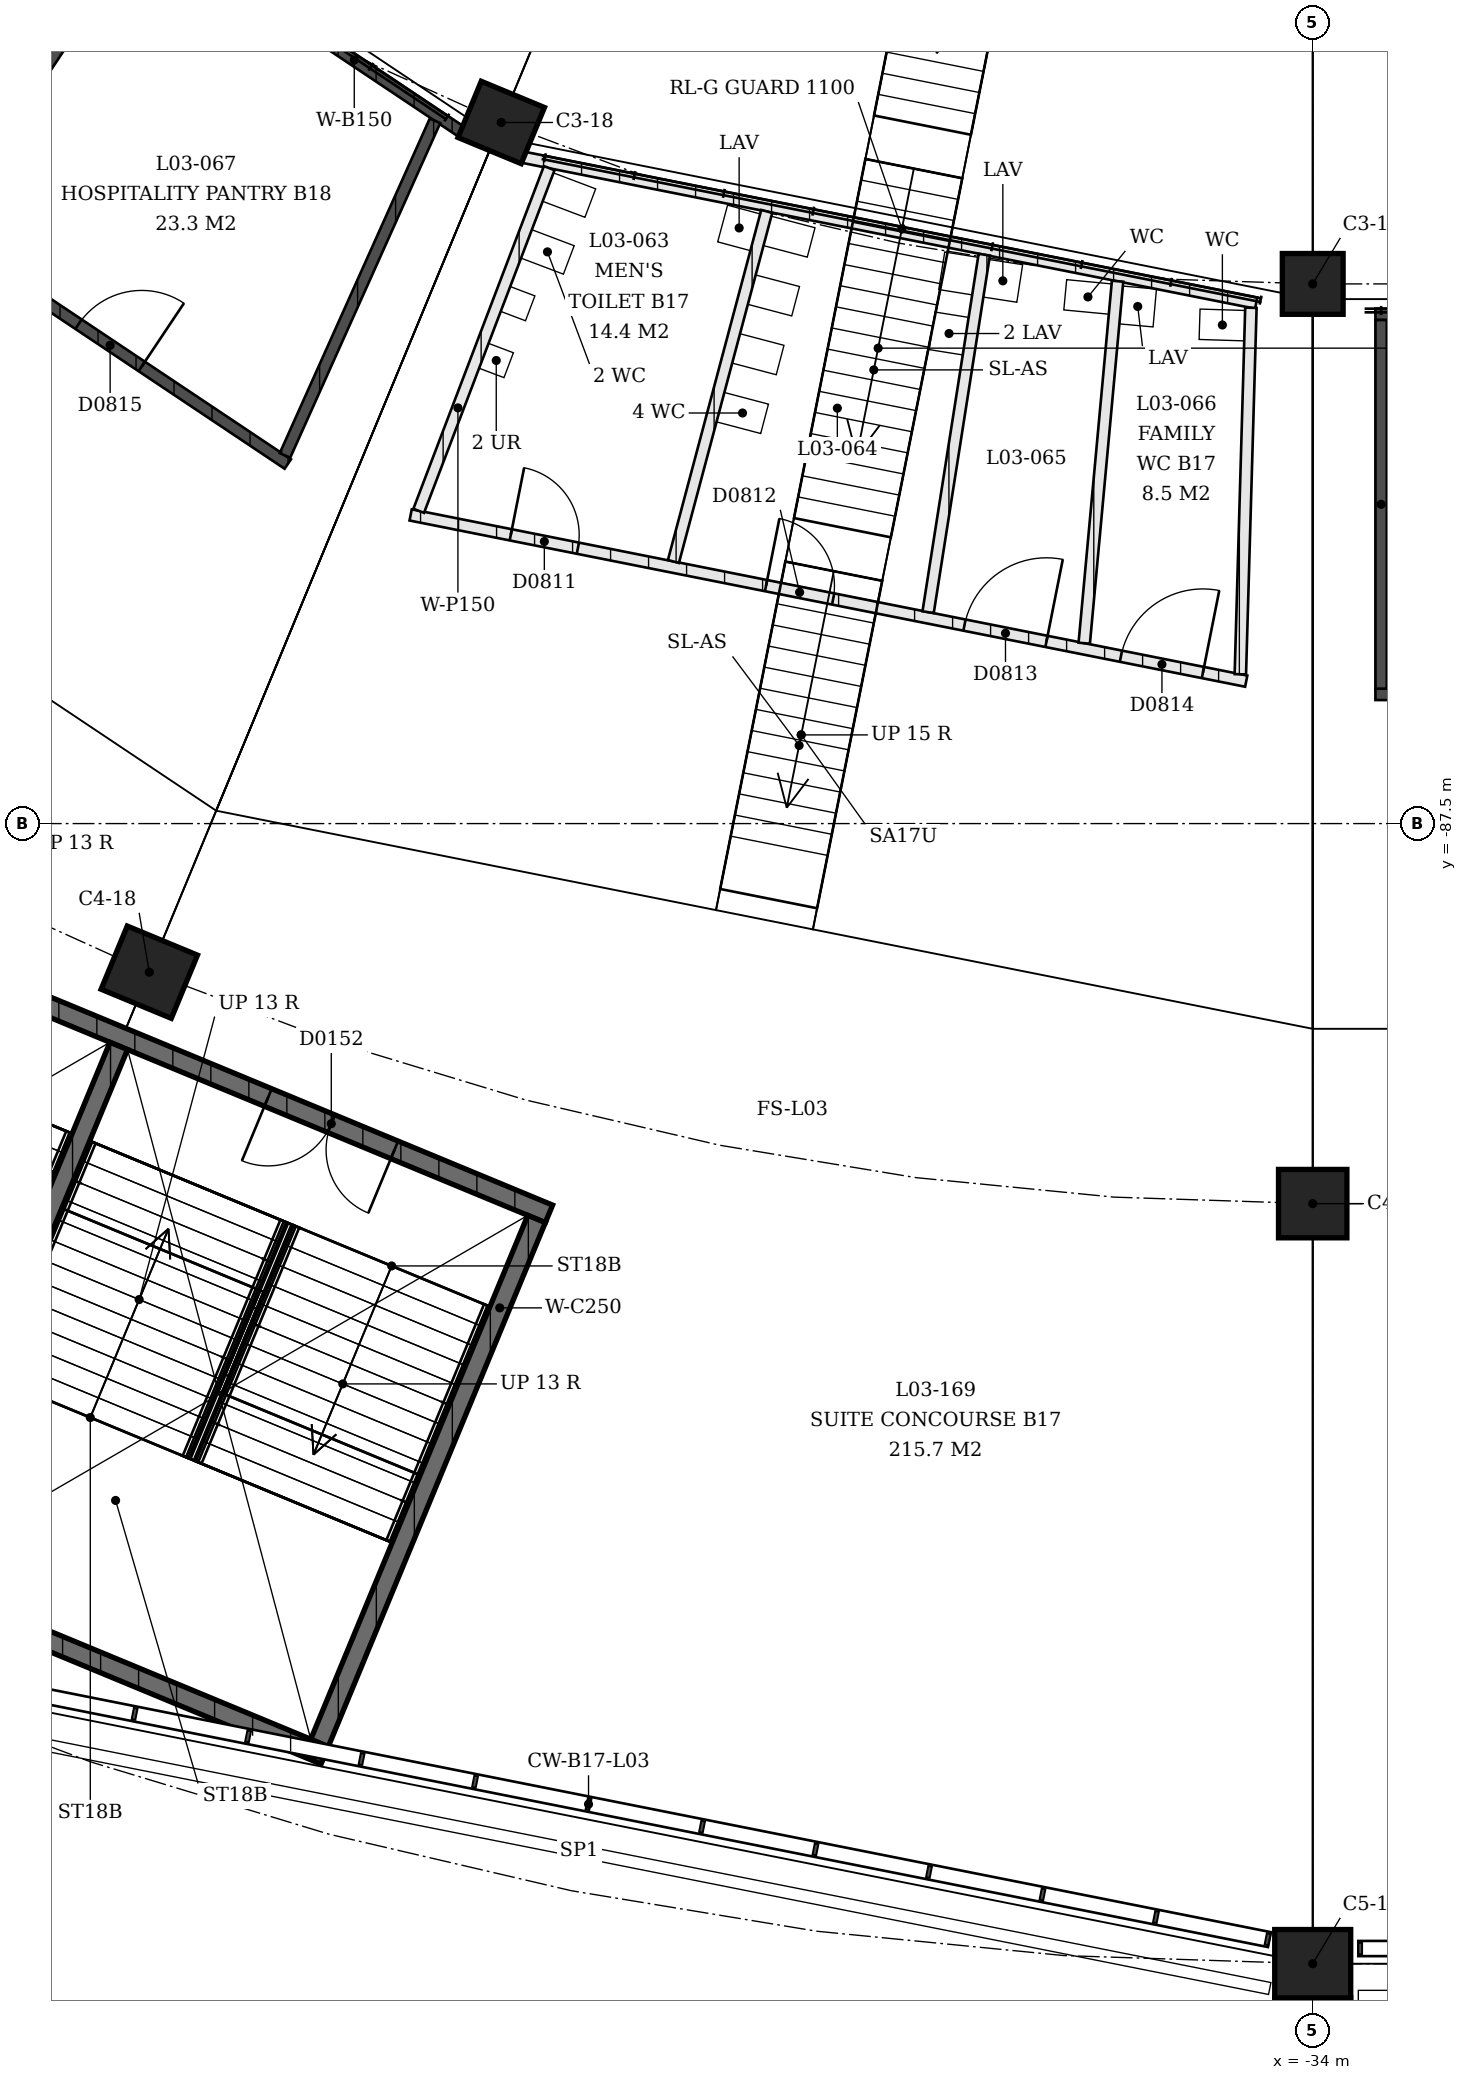
"""IFC4 building model, lengths in metres.
Left out: names, types, materials, properties, quantities, classifications, styles, units other than length and angle.
Written with IfcOpenShell. Run it as: python <this file> out.ifc"""

import sys

from ifc_helpers import new_model, si_unit, direction, frame, frame_2d, origin, origin_2d, place, context, subcontext, project, spatial, rectangle, extrude, element, fill, save


model = new_model("IFC4")
c1 = context("Model", 3, precision=1e-05, world=origin(), true_north=direction((0.0, 1.0)))
c2 = subcontext(c1, "Body", "Model", "MODEL_VIEW")
j1 = project(units=[si_unit("LENGTHUNIT", "METRE"), si_unit("PLANEANGLEUNIT", "RADIAN")], contexts=[c1])
p1 = place(None, origin())
s1 = spatial("IfcSite", under=j1, at=p1, CompositionType="ELEMENT")
p2 = place(p1, origin())
s2 = spatial("IfcBuilding", under=s1, at=p2, CompositionType="ELEMENT")
p3 = place(p2, frame((0.0, 0.0, 13.5)))
s3 = spatial("IfcBuildingStorey", under=s2, at=p3, CompositionType="ELEMENT", Elevation=13.5)
p4 = place(p3, frame((-34.0, -80.4, 0.0), z_axis=(0.0, 0.0, 1.0), x_axis=(1.0, 0.0, 0.0)))
e1 = element("IfcColumn", 1, at=p4, inside=s3, PredefinedType="COLUMN", context=c2, shape_type="SweptSolid", body=[
    extrude(rectangle(XDim=0.8, YDim=0.8, at=origin_2d()), origin(), (0.0, 0.0, 1.0), 2.033),
])
p5 = place(p3, frame((-34.0, -92.5, 0.0), z_axis=(0.0, 0.0, 1.0), x_axis=(1.0, 0.0, 0.0)))
e2 = element("IfcColumn", 2, at=p5, inside=s3, PredefinedType="COLUMN", context=c2, shape_type="SweptSolid", body=[
    extrude(rectangle(XDim=0.9, YDim=0.9, at=origin_2d()), origin(), (0.0, 0.0, 1.0), 4.5),
])
p6 = place(p3, frame((-34.0, -102.5, 0.0), z_axis=(0.0, 0.0, 1.0), x_axis=(1.0, 0.0, 0.0)))
e3 = element("IfcColumn", 3, at=p6, inside=s3, PredefinedType="COLUMN", context=c2, shape_type="SweptSolid", body=[
    extrude(rectangle(XDim=1.0, YDim=0.9, at=origin_2d()), origin(), (0.0, 0.0, 1.0), 4.5),
])
p7 = place(p3, frame((-44.677, -78.276, 0.0), z_axis=(0.0, 0.0, 1.0), x_axis=(0.923879532511, -0.382683432365, 0.0)))
e4 = element("IfcColumn", 4, at=p7, inside=s3, PredefinedType="COLUMN", context=c2, shape_type="SweptSolid", body=[
    extrude(rectangle(XDim=0.9, YDim=0.8, at=origin_2d()), origin(), (0.0, 0.0, 1.0), 2.033),
])
p8 = place(p3, frame((-49.307, -89.455, 0.0), z_axis=(0.0, 0.0, 1.0), x_axis=(0.923879532511, -0.382683432365, 0.0)))
e5 = element("IfcColumn", 5, at=p8, inside=s3, PredefinedType="COLUMN", context=c2, shape_type="SweptSolid", body=[
    extrude(rectangle(XDim=1.0, YDim=0.9, at=origin_2d()), origin(), (0.0, 0.0, 1.0), 4.5),
])
p9 = place(p3, frame((-55.274, -87.985, 0.0), z_axis=(0.0, 0.0, 1.0), x_axis=(0.923877480578, -0.382688386133, 0.0)))
e6 = element("IfcWall", 6, at=p9, inside=s3, PredefinedType="SHEAR", context=c2, shape_type="SweptSolid", body=[
    extrude(rectangle(XDim=12.15, YDim=0.25, at=frame_2d((6.075, 0.0))), origin(), (0.0, 0.0, 1.0), 4.09),
])
p10 = place(p9, frame((2.2, 0.0, 0.0)))
e7 = element("IfcOpeningElement", 7, at=p10, cuts=e6, PredefinedType="OPENING", context=c2, shape_type="SweptSolid", body=[
    extrude(rectangle(XDim=1.8, YDim=2.1, at=frame_2d((0.9, 1.05))), frame((0.0, 0.125, 0.0), z_axis=(0.0, -1.0, 0.0), x_axis=(1.0, 0.0, 0.0)), (0.0, 0.0, 1.0), 0.25),
])
p11 = place(p9, frame((8.15, 0.0, 0.0)))
e8 = element("IfcOpeningElement", 8, at=p11, cuts=e6, PredefinedType="OPENING", context=c2, shape_type="SweptSolid", body=[
    extrude(rectangle(XDim=1.8, YDim=2.1, at=frame_2d((0.9, 1.05))), frame((0.0, 0.125, 0.0), z_axis=(0.0, -1.0, 0.0), x_axis=(1.0, 0.0, 0.0)), (0.0, 0.0, 1.0), 0.25),
])
p12 = place(p3, frame((-58.224, -95.108, 0.0), z_axis=(0.0, 0.0, 1.0), x_axis=(0.923884584817, -0.382671234792, 0.0)))
e9 = element("IfcWall", 9, at=p12, inside=s3, PredefinedType="SHEAR", context=c2, shape_type="SweptSolid", body=[
    extrude(rectangle(XDim=12.15, YDim=0.25, at=frame_2d((6.075, 0.0))), origin(), (0.0, 0.0, 1.0), 4.09),
])
p13 = place(p3, frame((-44.212, -92.702, 0.0), z_axis=(0.0, 0.0, 1.0), x_axis=(-0.382664910245, -0.923887204407, 0.0)))
e10 = element("IfcWall", 10, at=p13, inside=s3, PredefinedType="SHEAR", context=c2, shape_type="SweptSolid", body=[
    extrude(rectangle(XDim=7.46, YDim=0.25, at=frame_2d((3.73, 0.0))), origin(), (0.0, 0.0, 1.0), 4.09),
])
p14 = place(p3, frame((-49.709, -90.425, 0.0), z_axis=(0.0, 0.0, 1.0), x_axis=(-0.382676480483, -0.923882412044, 0.0)))
e11 = element("IfcWall", 11, at=p14, inside=s3, PredefinedType="SHEAR", context=c2, shape_type="SweptSolid", body=[
    extrude(rectangle(XDim=7.46, YDim=0.25, at=frame_2d((3.73, 0.0))), origin(), (0.0, 0.0, 1.0), 4.09),
])
p15 = place(p3, frame((-20.9, -80.8, 0.0), z_axis=(0.0, 0.0, 1.0), x_axis=(-1.0, 0.0, 0.0)))
e12 = element("IfcWall", 12, at=p15, inside=s3, PredefinedType="SOLIDWALL", context=c2, shape_type="SweptSolid", body=[
    extrude(rectangle(XDim=12.275, YDim=0.15, at=frame_2d((6.138, 0.0))), origin(), (0.0, 0.0, 1.0), 3.0),
])
p16 = place(p3, frame((-21.225, -85.8, 0.0), z_axis=(0.0, 0.0, 1.0), x_axis=(-1.0, 0.0, 0.0)))
e13 = element("IfcWall", 13, at=p16, inside=s3, PredefinedType="SOLIDWALL", context=c2, shape_type="SweptSolid", body=[
    extrude(rectangle(XDim=11.95, YDim=0.15, at=frame_2d((5.975, 0.0))), origin(), (0.0, 0.0, 1.0), 3.0),
])
p17 = place(p16, frame((2.525, 0.0, 0.0)))
e14 = element("IfcOpeningElement", 14, at=p17, cuts=e13, PredefinedType="OPENING", context=c2, shape_type="SweptSolid", body=[
    extrude(rectangle(XDim=1.0, YDim=2.1, at=frame_2d((0.5, 1.05))), frame((0.0, 0.075, 0.0), z_axis=(0.0, -1.0, 0.0), x_axis=(1.0, 0.0, 0.0)), (0.0, 0.0, 1.0), 0.15),
])
p18 = place(p16, frame((8.425, 0.0, 0.0)))
e15 = element("IfcOpeningElement", 15, at=p18, cuts=e13, PredefinedType="OPENING", context=c2, shape_type="SweptSolid", body=[
    extrude(rectangle(XDim=1.0, YDim=2.1, at=frame_2d((0.5, 1.05))), frame((0.0, 0.075, 0.0), z_axis=(0.0, -1.0, 0.0), x_axis=(1.0, 0.0, 0.0)), (0.0, 0.0, 1.0), 0.15),
])
p19 = place(p3, frame((-33.1, -80.875, 0.0), z_axis=(0.0, 0.0, 1.0), x_axis=(0.0, -1.0, 0.0)))
e16 = element("IfcWall", 16, at=p19, inside=s3, PredefinedType="SOLIDWALL", context=c2, shape_type="SweptSolid", body=[
    extrude(rectangle(XDim=4.85, YDim=0.15, at=frame_2d((2.425, 0.0))), origin(), (0.0, 0.0, 1.0), 3.0),
])
p20 = place(p3, frame((-44.38, -78.735, 0.0), z_axis=(0.0, 0.0, 1.0), x_axis=(0.980786564352, -0.19508386706, 0.0)))
e17 = element("IfcWall", 17, at=p20, inside=s3, PredefinedType="PARTITIONING", context=c2, shape_type="SweptSolid", body=[
    extrude(rectangle(XDim=9.825, YDim=0.15, at=frame_2d((4.913, 0.0))), origin(), (0.0, 0.0, 1.0), 3.0),
])
p21 = place(p3, frame((-45.869, -83.439, 0.0), z_axis=(0.0, 0.0, 1.0), x_axis=(0.980786208969, -0.195085653744, 0.0)))
e18 = element("IfcWall", 18, at=p21, inside=s3, PredefinedType="PARTITIONING", context=c2, shape_type="SweptSolid", body=[
    extrude(rectangle(XDim=11.209, YDim=0.15, at=frame_2d((5.604, 0.0))), origin(), (0.0, 0.0, 1.0), 3.0),
])
p22 = place(p21, frame((1.343, 0.0, 0.0)))
e19 = element("IfcOpeningElement", 19, at=p22, cuts=e18, PredefinedType="OPENING", context=c2, shape_type="SweptSolid", body=[
    extrude(rectangle(XDim=0.9, YDim=2.1, at=frame_2d((0.45, 1.05))), frame((0.0, 0.075, 0.0), z_axis=(0.0, -1.0, 0.0), x_axis=(1.0, 0.0, 0.0)), (0.0, 0.0, 1.0), 0.15),
])
p23 = place(p21, frame((4.768, 0.0, 0.0)))
e20 = element("IfcOpeningElement", 20, at=p23, cuts=e18, PredefinedType="OPENING", context=c2, shape_type="SweptSolid", body=[
    extrude(rectangle(XDim=0.9, YDim=2.1, at=frame_2d((0.45, 1.05))), frame((0.0, 0.075, 0.0), z_axis=(0.0, -1.0, 0.0), x_axis=(1.0, 0.0, 0.0)), (0.0, 0.0, 1.0), 0.15),
])
p24 = place(p21, frame((7.43, 0.0, 0.0)))
e21 = element("IfcOpeningElement", 21, at=p24, cuts=e18, PredefinedType="OPENING", context=c2, shape_type="SweptSolid", body=[
    extrude(rectangle(XDim=1.1, YDim=2.1, at=frame_2d((0.55, 1.05))), frame((0.0, 0.075, 0.0), z_axis=(0.0, -1.0, 0.0), x_axis=(1.0, 0.0, 0.0)), (0.0, 0.0, 1.0), 0.15),
])
p25 = place(p21, frame((9.529, 0.0, 0.0)))
e22 = element("IfcOpeningElement", 22, at=p25, cuts=e18, PredefinedType="OPENING", context=c2, shape_type="SweptSolid", body=[
    extrude(rectangle(XDim=1.1, YDim=2.1, at=frame_2d((0.55, 1.05))), frame((0.0, 0.075, 0.0), z_axis=(0.0, -1.0, 0.0), x_axis=(1.0, 0.0, 0.0)), (0.0, 0.0, 1.0), 0.15),
])
p26 = place(p3, frame((-44.045, -78.877, 0.0), z_axis=(0.0, 0.0, 1.0), x_axis=(-0.355921670207, -0.934515791561, 0.0)))
e23 = element("IfcWall", 23, at=p26, inside=s3, PredefinedType="PARTITIONING", context=c2, shape_type="SweptSolid", body=[
    extrude(rectangle(XDim=4.824, YDim=0.15, at=frame_2d((2.412, 0.0))), origin(), (0.0, 0.0, 1.0), 3.0),
])
p27 = place(p3, frame((-41.183, -79.446, 0.0), z_axis=(0.0, 0.0, 1.0), x_axis=(-0.257618021969, -0.966246839455, 0.0)))
e24 = element("IfcWall", 24, at=p27, inside=s3, PredefinedType="PARTITIONING", context=c2, shape_type="SweptSolid", body=[
    extrude(rectangle(XDim=4.767, YDim=0.15, at=frame_2d((2.383, 0.0))), origin(), (0.0, 0.0, 1.0), 3.0),
])
p28 = place(p3, frame((-38.322, -80.015, 0.0), z_axis=(0.0, 0.0, 1.0), x_axis=(-0.155127731688, -0.987894420908, 0.0)))
e25 = element("IfcWall", 25, at=p28, inside=s3, PredefinedType="PARTITIONING", context=c2, shape_type="SweptSolid", body=[
    extrude(rectangle(XDim=4.761, YDim=0.15, at=frame_2d((2.38, 0.0))), origin(), (0.0, 0.0, 1.0), 3.0),
])
p29 = place(p3, frame((-36.567, -80.364, 0.0), z_axis=(0.0, 0.0, 1.0), x_axis=(-0.091727705385, -0.995784127241, 0.0)))
e26 = element("IfcWall", 26, at=p29, inside=s3, PredefinedType="PARTITIONING", context=c2, shape_type="SweptSolid", body=[
    extrude(rectangle(XDim=4.783, YDim=0.15, at=frame_2d((2.392, 0.0))), origin(), (0.0, 0.0, 1.0), 3.0),
])
p30 = place(p3, frame((-34.813, -80.713, 0.0), z_axis=(0.0, 0.0, 1.0), x_axis=(-0.028793807365, -0.999585372371, 0.0)))
e27 = element("IfcWall", 27, at=p30, inside=s3, PredefinedType="PARTITIONING", context=c2, shape_type="SweptSolid", body=[
    extrude(rectangle(XDim=4.824, YDim=0.15, at=frame_2d((2.412, 0.0))), origin(), (0.0, 0.0, 1.0), 3.0),
])
p31 = place(p3, frame((-45.211, -78.391, 0.0), z_axis=(0.0, 0.0, 1.0), x_axis=(-0.831470078842, 0.555569534793, 0.0)))
e28 = element("IfcWall", 28, at=p31, inside=s3, PredefinedType="SOLIDWALL", context=c2, shape_type="SweptSolid", body=[
    extrude(rectangle(XDim=9.718, YDim=0.15, at=frame_2d((4.859, 0.0))), origin(), (0.0, 0.0, 1.0), 3.0),
])
p32 = place(p3, frame((-47.485, -82.77, 0.0), z_axis=(0.0, 0.0, 1.0), x_axis=(-0.831470287315, 0.555569222791, 0.0)))
e29 = element("IfcWall", 29, at=p32, inside=s3, PredefinedType="SOLIDWALL", context=c2, shape_type="SweptSolid", body=[
    extrude(rectangle(XDim=11.082, YDim=0.15, at=frame_2d((5.541, 0.0))), origin(), (0.0, 0.0, 1.0), 3.0),
])
p33 = place(p32, frame((2.311, 0.0, 0.0)))
e30 = element("IfcOpeningElement", 30, at=p33, cuts=e29, PredefinedType="OPENING", context=c2, shape_type="SweptSolid", body=[
    extrude(rectangle(XDim=1.0, YDim=2.1, at=frame_2d((0.5, 1.05))), frame((0.0, 0.075, 0.0), z_axis=(0.0, -1.0, 0.0), x_axis=(1.0, 0.0, 0.0)), (0.0, 0.0, 1.0), 0.15),
])
p34 = place(p32, frame((7.771, 0.0, 0.0)))
e31 = element("IfcOpeningElement", 31, at=p34, cuts=e29, PredefinedType="OPENING", context=c2, shape_type="SweptSolid", body=[
    extrude(rectangle(XDim=1.0, YDim=2.1, at=frame_2d((0.5, 1.05))), frame((0.0, 0.075, 0.0), z_axis=(0.0, -1.0, 0.0), x_axis=(1.0, 0.0, 0.0)), (0.0, 0.0, 1.0), 0.15),
])
p35 = place(p3, frame((-45.548, -78.254, 0.0), z_axis=(0.0, 0.0, 1.0), x_axis=(-0.409145990025, -0.912468935825, 0.0)))
e32 = element("IfcWall", 32, at=p35, inside=s3, PredefinedType="SOLIDWALL", context=c2, shape_type="SweptSolid", body=[
    extrude(rectangle(XDim=4.824, YDim=0.15, at=frame_2d((2.412, 0.0))), origin(), (0.0, 0.0, 1.0), 3.0),
])
p36 = place(p3, frame((-49.417, -75.67, 0.0), z_axis=(0.0, 0.0, 1.0), x_axis=(-0.553989356348, -0.832523749243, 0.0)))
e33 = element("IfcWall", 33, at=p36, inside=s3, PredefinedType="SOLIDWALL", context=c2, shape_type="SweptSolid", body=[
    extrude(rectangle(XDim=4.757, YDim=0.15, at=frame_2d((2.378, 0.0))), origin(), (0.0, 0.0, 1.0), 3.0),
])
p37 = place(p11, origin())
e34 = element("IfcDoor", 34, at=p37, inside=s3, OperationType="DOUBLE_DOOR_SINGLE_SWING", PredefinedType="DOOR", context=c2, shape_type="SweptSolid", body=[
    extrude(rectangle(XDim=1.8, YDim=2.1, at=frame_2d((0.9, 1.05))), frame((0.0, 0.025, 0.0), z_axis=(0.0, -1.0, 0.0), x_axis=(1.0, 0.0, 0.0)), (0.0, 0.0, 1.0), 0.05),
])
fill(e8, e34)
p38 = place(p22, origin())
e35 = element("IfcDoor", 35, at=p38, inside=s3, OperationType="SINGLE_SWING_RIGHT", PredefinedType="DOOR", context=c2, shape_type="SweptSolid", body=[
    extrude(rectangle(XDim=0.9, YDim=2.1, at=frame_2d((0.45, 1.05))), frame((0.0, 0.025, 0.0), z_axis=(0.0, -1.0, 0.0), x_axis=(1.0, 0.0, 0.0)), (0.0, 0.0, 1.0), 0.05),
])
fill(e19, e35)
p39 = place(p23, origin())
e36 = element("IfcDoor", 36, at=p39, inside=s3, OperationType="SINGLE_SWING_RIGHT", PredefinedType="DOOR", context=c2, shape_type="SweptSolid", body=[
    extrude(rectangle(XDim=0.9, YDim=2.1, at=frame_2d((0.45, 1.05))), frame((0.0, 0.025, 0.0), z_axis=(0.0, -1.0, 0.0), x_axis=(1.0, 0.0, 0.0)), (0.0, 0.0, 1.0), 0.05),
])
fill(e20, e36)
p40 = place(p24, origin())
e37 = element("IfcDoor", 37, at=p40, inside=s3, OperationType="SINGLE_SWING_LEFT", PredefinedType="DOOR", context=c2, shape_type="SweptSolid", body=[
    extrude(rectangle(XDim=1.1, YDim=2.1, at=frame_2d((0.55, 1.05))), frame((0.0, 0.025, 0.0), z_axis=(0.0, -1.0, 0.0), x_axis=(1.0, 0.0, 0.0)), (0.0, 0.0, 1.0), 0.05),
])
fill(e21, e37)
p41 = place(p25, origin())
e38 = element("IfcDoor", 38, at=p41, inside=s3, OperationType="SINGLE_SWING_LEFT", PredefinedType="DOOR", context=c2, shape_type="SweptSolid", body=[
    extrude(rectangle(XDim=1.1, YDim=2.1, at=frame_2d((0.55, 1.05))), frame((0.0, 0.025, 0.0), z_axis=(0.0, -1.0, 0.0), x_axis=(1.0, 0.0, 0.0)), (0.0, 0.0, 1.0), 0.05),
])
fill(e22, e38)
p42 = place(p33, origin())
e39 = element("IfcDoor", 39, at=p42, inside=s3, OperationType="SINGLE_SWING_LEFT", PredefinedType="DOOR", context=c2, shape_type="SweptSolid", body=[
    extrude(rectangle(XDim=1.0, YDim=2.1, at=frame_2d((0.5, 1.05))), frame((0.0, 0.025, 0.0), z_axis=(0.0, -1.0, 0.0), x_axis=(1.0, 0.0, 0.0)), (0.0, 0.0, 1.0), 0.05),
])
fill(e30, e39)
save(model, sys.argv[1])
